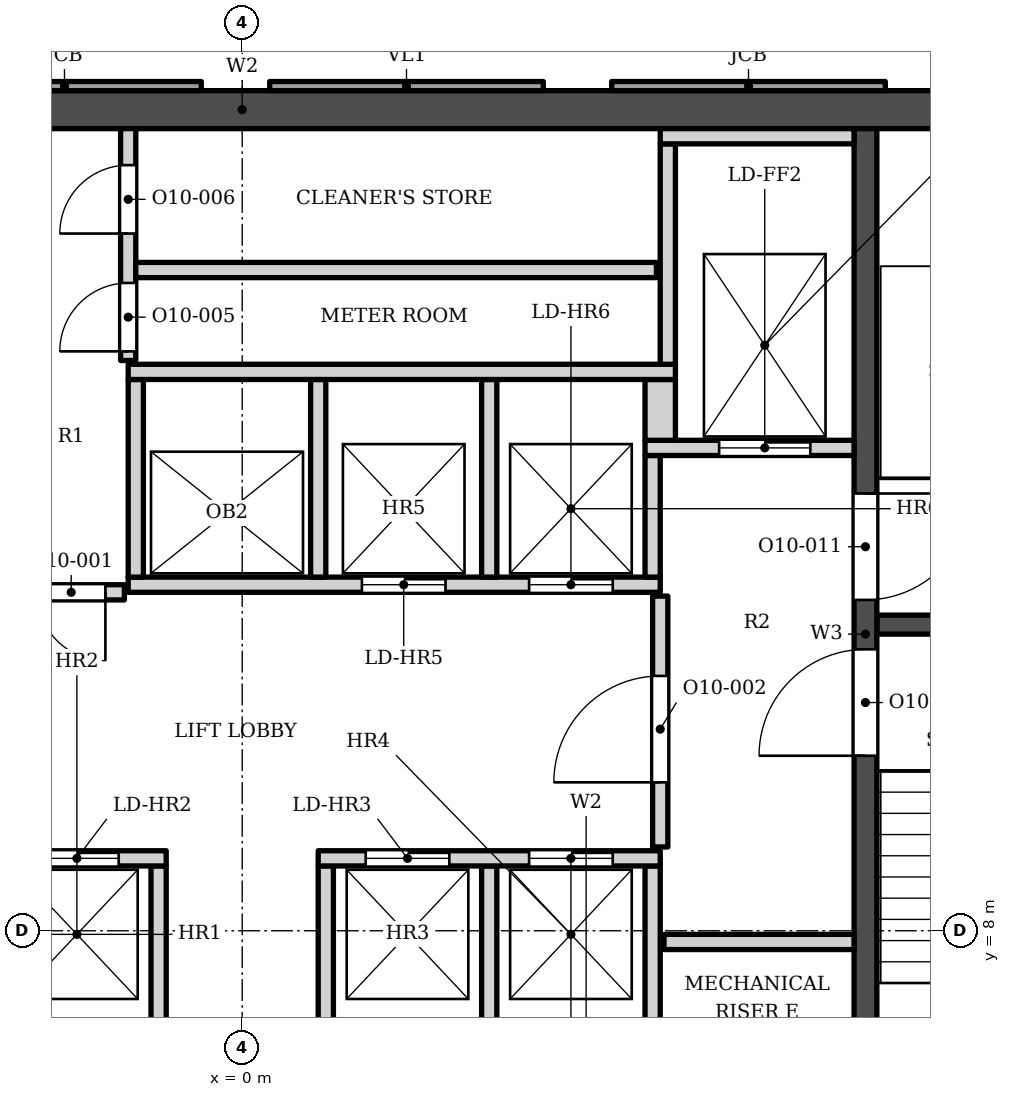
"""IFC4 building model, lengths in metres.
Left out: names, types, materials, properties, quantities, classifications, styles, units other than length and angle.
Written with IfcOpenShell. Run it as: python <this file> out.ifc"""

import sys

from ifc_helpers import new_model, si_unit, direction, frame, frame_2d, origin, place, context, subcontext, project, spatial, polyline, rectangle, outline, extrude, element, fill, save


model = new_model("IFC4")
c1 = context("Model", 3, precision=1e-05, world=origin(), true_north=direction((0.0, 1.0)))
c2 = subcontext(c1, "Body", "Model", "MODEL_VIEW")
j1 = project(units=[si_unit("LENGTHUNIT", "METRE"), si_unit("PLANEANGLEUNIT", "RADIAN")], contexts=[c1])
p1 = place(None, origin())
s1 = spatial("IfcSite", under=j1, at=p1, CompositionType="ELEMENT")
p2 = place(p1, origin())
s2 = spatial("IfcBuilding", under=s1, at=p2, CompositionType="ELEMENT")
p3 = place(p2, frame((0.0, 0.0, 259.9)))
s3 = spatial("IfcBuildingStorey", under=s2, at=p3, CompositionType="ELEMENT", Elevation=259.9)
p4 = place(p3, frame((-12.1, 18.802, 0.0), z_axis=(0.0, 0.0, 1.0), x_axis=(1.0, 0.0, 0.0)))
e1 = element("IfcWall", 1, at=p4, inside=s3, PredefinedType="SHEAR", context=c2, shape_type="SweptSolid", body=[
    extrude(rectangle(XDim=24.2, YDim=0.5, at=frame_2d((12.1, 0.0))), origin(), (0.0, 0.0, 1.0), 3.9),
])
p5 = place(p3, frame((8.2, 5.253, 0.0), z_axis=(0.0, 0.0, 1.0), x_axis=(0.0, 1.0, 0.0)))
e2 = element("IfcWall", 2, at=p5, inside=s3, PredefinedType="SHEAR", context=c2, shape_type="SweptSolid", body=[
    extrude(rectangle(XDim=13.3, YDim=0.3, at=frame_2d((6.65, 0.0))), origin(), (0.0, 0.0, 1.0), 3.9),
])
p6 = place(p5, frame((7.1, 0.0, 0.0)))
e3 = element("IfcOpeningElement", 3, at=p6, cuts=e2, PredefinedType="OPENING", context=c2, shape_type="SweptSolid", body=[
    extrude(rectangle(XDim=1.4, YDim=2.1, at=frame_2d((0.7, 1.05))), frame((0.0, 0.16, 0.0), z_axis=(0.0, -1.0, 0.0), x_axis=(1.0, 0.0, 0.0)), (0.0, 0.0, 1.0), 0.32),
])
p7 = place(p5, frame((5.05, 0.0, 0.0)))
e4 = element("IfcOpeningElement", 4, at=p7, cuts=e2, PredefinedType="OPENING", context=c2, shape_type="SweptSolid", body=[
    extrude(rectangle(XDim=1.4, YDim=2.1, at=frame_2d((0.7, 1.05))), frame((0.0, 0.16, 0.0), z_axis=(0.0, -1.0, 0.0), x_axis=(1.0, 0.0, 0.0)), (0.0, 0.0, 1.0), 0.32),
])
p8 = place(p3, frame((8.35, 12.028, 0.0), z_axis=(0.0, 0.0, 1.0), x_axis=(1.0, 0.0, 0.0)))
e5 = element("IfcWall", 5, at=p8, inside=s3, PredefinedType="SHEAR", context=c2, shape_type="SweptSolid", body=[
    extrude(rectangle(XDim=3.75, YDim=0.25, at=frame_2d((1.875, 0.0))), origin(), (0.0, 0.0, 1.0), 3.9),
])
p9 = place(p3, origin())
e6 = element("IfcWall", 6, at=p9, inside=s3, PredefinedType="SOLIDWALL", context=c2, shape_type="SweptSolid", body=[
    extrude(outline(polyline([(4.862, 19.173), (4.862, 19.052), (8.461, 19.052), (8.461, 19.173), (4.862, 19.173)])), origin(), (0.0, 0.0, 1.0), 3.0),
])
p10 = place(p3, origin())
e7 = element("IfcWall", 7, at=p10, inside=s3, PredefinedType="ELEMENTEDWALL", context=c2, shape_type="SweptSolid", body=[
    extrude(outline(polyline([(0.362, 19.173), (0.362, 19.052), (3.961, 19.052), (3.961, 19.173), (0.362, 19.173)])), origin(), (0.0, 0.0, 1.0), 3.0),
])
p11 = place(p3, origin())
e8 = element("IfcWall", 8, at=p11, inside=s3, PredefinedType="SOLIDWALL", context=c2, shape_type="SweptSolid", body=[
    extrude(outline(polyline([(-4.138, 19.173), (-4.138, 19.052), (-0.539, 19.052), (-0.539, 19.173), (-4.138, 19.173)])), origin(), (0.0, 0.0, 1.0), 3.0),
])
for number, where, z_axis, x_axis in (
    (9, (-1.1, 6.353, 0.0), (0.0, 0.0, 1.0), (0.0, 1.0, 0.0)),
    (10, (1.1, 6.353, 0.0), (0.0, 0.0, 1.0), (0.0, 1.0, 0.0)),
    (11, (3.25, 6.353, 0.0), (0.0, 0.0, 1.0), (0.0, 1.0, 0.0)),
    (12, (5.4, 6.353, 0.0), (0.0, 0.0, 1.0), (0.0, 1.0, 0.0)),
    (13, (5.55, 7.853, 0.0), (0.0, 0.0, 1.0), (1.0, 0.0, 0.0)),
):
    element("IfcWall", number, at=place(p3, frame(where, z_axis=z_axis, x_axis=x_axis)), inside=s3, PredefinedType="SOLIDWALL", context=c2, shape_type="SweptSolid", body=[
        extrude(rectangle(XDim=2.5, YDim=0.2, at=frame_2d((1.25, 0.0))), origin(), (0.0, 0.0, 1.0), 3.73),
    ])
p12 = place(p3, frame((-5.5, 8.953, 0.0), z_axis=(0.0, 0.0, 1.0), x_axis=(1.0, 0.0, 0.0)))
e14 = element("IfcWall", 14, at=p12, inside=s3, PredefinedType="SOLIDWALL", context=c2, shape_type="SweptSolid", body=[
    extrude(rectangle(XDim=4.5, YDim=0.2, at=frame_2d((2.25, 0.0))), origin(), (0.0, 0.0, 1.0), 3.73),
])
p13 = place(p12, frame((0.625, 0.0, 0.0)))
e15 = element("IfcOpeningElement", 15, at=p13, cuts=e14, PredefinedType="OPENING", context=c2, shape_type="SweptSolid", body=[
    extrude(rectangle(XDim=1.1, YDim=2.1, at=frame_2d((0.55, 1.05))), frame((0.0, 0.11, 0.0), z_axis=(0.0, -1.0, 0.0), x_axis=(1.0, 0.0, 0.0)), (0.0, 0.0, 1.0), 0.22),
])
p14 = place(p12, frame((2.775, 0.0, 0.0)))
e16 = element("IfcOpeningElement", 16, at=p14, cuts=e14, PredefinedType="OPENING", context=c2, shape_type="SweptSolid", body=[
    extrude(rectangle(XDim=1.1, YDim=2.1, at=frame_2d((0.55, 1.05))), frame((0.0, 0.11, 0.0), z_axis=(0.0, -1.0, 0.0), x_axis=(1.0, 0.0, 0.0)), (0.0, 0.0, 1.0), 0.22),
])
p15 = place(p3, frame((1.0, 8.953, 0.0), z_axis=(0.0, 0.0, 1.0), x_axis=(1.0, 0.0, 0.0)))
e17 = element("IfcWall", 17, at=p15, inside=s3, PredefinedType="SOLIDWALL", context=c2, shape_type="SweptSolid", body=[
    extrude(rectangle(XDim=4.5, YDim=0.2, at=frame_2d((2.25, 0.0))), origin(), (0.0, 0.0, 1.0), 3.73),
])
p16 = place(p15, frame((0.625, 0.0, 0.0)))
e18 = element("IfcOpeningElement", 18, at=p16, cuts=e17, PredefinedType="OPENING", context=c2, shape_type="SweptSolid", body=[
    extrude(rectangle(XDim=1.1, YDim=2.1, at=frame_2d((0.55, 1.05))), frame((0.0, 0.11, 0.0), z_axis=(0.0, -1.0, 0.0), x_axis=(1.0, 0.0, 0.0)), (0.0, 0.0, 1.0), 0.22),
])
p17 = place(p15, frame((2.775, 0.0, 0.0)))
e19 = element("IfcOpeningElement", 19, at=p17, cuts=e17, PredefinedType="OPENING", context=c2, shape_type="SweptSolid", body=[
    extrude(rectangle(XDim=1.1, YDim=2.1, at=frame_2d((0.55, 1.05))), frame((0.0, 0.11, 0.0), z_axis=(0.0, -1.0, 0.0), x_axis=(1.0, 0.0, 0.0)), (0.0, 0.0, 1.0), 0.22),
])
p18 = place(p3, frame((5.5, 9.103, 0.0), z_axis=(0.0, 0.0, 1.0), x_axis=(0.0, 1.0, 0.0)))
e20 = element("IfcWall", 20, at=p18, inside=s3, PredefinedType="SOLIDWALL", context=c2, shape_type="SweptSolid", body=[
    extrude(rectangle(XDim=3.3, YDim=0.2, at=frame_2d((1.65, 0.0))), origin(), (0.0, 0.0, 1.0), 3.73),
])
p19 = place(p18, frame((0.85, 0.0, 0.0)))
e21 = element("IfcOpeningElement", 21, at=p19, cuts=e20, PredefinedType="OPENING", context=c2, shape_type="SweptSolid", body=[
    extrude(rectangle(XDim=1.4, YDim=2.1, at=frame_2d((0.7, 1.05))), frame((0.0, 0.11, 0.0), z_axis=(0.0, -1.0, 0.0), x_axis=(1.0, 0.0, 0.0)), (0.0, 0.0, 1.0), 0.22),
])
p20 = place(p3, frame((-2.95, 12.453, 0.0), z_axis=(0.0, 0.0, 1.0), x_axis=(1.0, 0.0, 0.0)))
e22 = element("IfcWall", 22, at=p20, inside=s3, PredefinedType="SOLIDWALL", context=c2, shape_type="SweptSolid", body=[
    extrude(rectangle(XDim=1.4, YDim=0.2, at=frame_2d((0.7, 0.0))), origin(), (0.0, 0.0, 1.0), 3.73),
])
p21 = place(p20, frame((0.25, 0.0, 0.0)))
e23 = element("IfcOpeningElement", 23, at=p21, cuts=e22, PredefinedType="OPENING", context=c2, shape_type="SweptSolid", body=[
    extrude(rectangle(XDim=0.9, YDim=2.1, at=frame_2d((0.45, 1.05))), frame((0.0, 0.11, 0.0), z_axis=(0.0, -1.0, 0.0), x_axis=(1.0, 0.0, 0.0)), (0.0, 0.0, 1.0), 0.22),
])
p22 = place(p3, frame((-1.5, 12.552, 0.0), z_axis=(0.0, 0.0, 1.0), x_axis=(1.0, 0.0, 0.0)))
e24 = element("IfcWall", 24, at=p22, inside=s3, PredefinedType="SOLIDWALL", context=c2, shape_type="SweptSolid", body=[
    extrude(rectangle(XDim=7.0, YDim=0.2, at=frame_2d((3.5, 0.0))), origin(), (0.0, 0.0, 1.0), 3.73),
])
p23 = place(p22, frame((3.075, 0.0, 0.0)))
e25 = element("IfcOpeningElement", 25, at=p23, cuts=e24, PredefinedType="OPENING", context=c2, shape_type="SweptSolid", body=[
    extrude(rectangle(XDim=1.1, YDim=2.1, at=frame_2d((0.55, 1.05))), frame((0.0, 0.11, 0.0), z_axis=(0.0, -1.0, 0.0), x_axis=(1.0, 0.0, 0.0)), (0.0, 0.0, 1.0), 0.22),
])
p24 = place(p22, frame((5.275, 0.0, 0.0)))
e26 = element("IfcOpeningElement", 26, at=p24, cuts=e24, PredefinedType="OPENING", context=c2, shape_type="SweptSolid", body=[
    extrude(rectangle(XDim=1.1, YDim=2.1, at=frame_2d((0.55, 1.05))), frame((0.0, 0.11, 0.0), z_axis=(0.0, -1.0, 0.0), x_axis=(1.0, 0.0, 0.0)), (0.0, 0.0, 1.0), 0.22),
])
for number, where, z_axis, x_axis in (
    (27, (-1.4, 12.653, 0.0), (0.0, 0.0, 1.0), (0.0, 1.0, 0.0)),
    (28, (1.0, 12.653, 0.0), (0.0, 0.0, 1.0), (0.0, 1.0, 0.0)),
    (29, (3.25, 12.653, 0.0), (0.0, 0.0, 1.0), (0.0, 1.0, 0.0)),
):
    element("IfcWall", number, at=place(p3, frame(where, z_axis=z_axis, x_axis=x_axis)), inside=s3, PredefinedType="SOLIDWALL", context=c2, shape_type="SweptSolid", body=[
        extrude(rectangle(XDim=2.6, YDim=0.2, at=frame_2d((1.3, 0.0))), origin(), (0.0, 0.0, 1.0), 3.73),
    ])
p25 = place(p3, frame((5.4, 12.653, 0.0), z_axis=(0.0, 0.0, 1.0), x_axis=(0.0, 1.0, 0.0)))
e30 = element("IfcWall", 30, at=p25, inside=s3, PredefinedType="SOLIDWALL", context=c2, shape_type="SweptSolid", body=[
    extrude(rectangle(XDim=1.6, YDim=0.2, at=frame_2d((0.8, 0.0))), origin(), (0.0, 0.0, 1.0), 3.73),
])
p26 = place(p3, frame((5.3, 14.353, 0.0), z_axis=(0.0, 0.0, 1.0), x_axis=(1.0, 0.0, 0.0)))
e31 = element("IfcWall", 31, at=p26, inside=s3, PredefinedType="SOLIDWALL", context=c2, shape_type="SweptSolid", body=[
    extrude(rectangle(XDim=2.75, YDim=0.2, at=frame_2d((1.375, 0.0))), origin(), (0.0, 0.0, 1.0), 3.73),
])
p27 = place(p26, frame((0.975, 0.0, 0.0)))
e32 = element("IfcOpeningElement", 32, at=p27, cuts=e31, PredefinedType="OPENING", context=c2, shape_type="SweptSolid", body=[
    extrude(rectangle(XDim=1.2, YDim=2.1, at=frame_2d((0.6, 1.05))), frame((0.0, 0.11, 0.0), z_axis=(0.0, -1.0, 0.0), x_axis=(1.0, 0.0, 0.0)), (0.0, 0.0, 1.0), 0.22),
])
p28 = place(p3, frame((5.5, 14.453, 0.0), z_axis=(0.0, 0.0, 1.0), x_axis=(0.0, 1.0, 0.0)))
e33 = element("IfcWall", 33, at=p28, inside=s3, PredefinedType="SOLIDWALL", context=c2, shape_type="SweptSolid", body=[
    extrude(rectangle(XDim=0.8, YDim=0.4, at=frame_2d((0.4, 0.0))), origin(), (0.0, 0.0, 1.0), 3.73),
])
p29 = place(p3, frame((-1.5, 15.353, 0.0), z_axis=(0.0, 0.0, 1.0), x_axis=(1.0, 0.0, 0.0)))
e34 = element("IfcWall", 34, at=p29, inside=s3, PredefinedType="SOLIDWALL", context=c2, shape_type="SweptSolid", body=[
    extrude(rectangle(XDim=7.2, YDim=0.2, at=frame_2d((3.6, 0.0))), origin(), (0.0, 0.0, 1.0), 3.73),
])
p30 = place(p3, frame((5.6, 15.453, 0.0), z_axis=(0.0, 0.0, 1.0), x_axis=(0.0, 1.0, 0.0)))
e35 = element("IfcWall", 35, at=p30, inside=s3, PredefinedType="SOLIDWALL", context=c2, shape_type="SweptSolid", body=[
    extrude(rectangle(XDim=2.9, YDim=0.2, at=frame_2d((1.45, 0.0))), origin(), (0.0, 0.0, 1.0), 3.73),
])
p31 = place(p3, frame((-1.5, 15.503, 0.0), z_axis=(0.0, 0.0, 1.0), x_axis=(0.0, 1.0, 0.0)))
e36 = element("IfcWall", 36, at=p31, inside=s3, PredefinedType="SOLIDWALL", context=c2, shape_type="SweptSolid", body=[
    extrude(rectangle(XDim=3.05, YDim=0.2, at=frame_2d((1.525, 0.0))), origin(), (0.0, 0.0, 1.0), 3.73),
])
p32 = place(p31, frame((0.12, 0.0, 0.0)))
e37 = element("IfcOpeningElement", 37, at=p32, cuts=e36, PredefinedType="OPENING", context=c2, shape_type="SweptSolid", body=[
    extrude(rectangle(XDim=0.9, YDim=2.1, at=frame_2d((0.45, 1.05))), frame((0.0, 0.11, 0.0), z_axis=(0.0, -1.0, 0.0), x_axis=(1.0, 0.0, 0.0)), (0.0, 0.0, 1.0), 0.22),
])
p33 = place(p31, frame((1.67, 0.0, 0.0)))
e38 = element("IfcOpeningElement", 38, at=p33, cuts=e36, PredefinedType="OPENING", context=c2, shape_type="SweptSolid", body=[
    extrude(rectangle(XDim=0.9, YDim=2.1, at=frame_2d((0.45, 1.05))), frame((0.0, 0.11, 0.0), z_axis=(0.0, -1.0, 0.0), x_axis=(1.0, 0.0, 0.0)), (0.0, 0.0, 1.0), 0.22),
])
p34 = place(p3, frame((-1.4, 16.693, 0.0), z_axis=(0.0, 0.0, 1.0), x_axis=(1.0, 0.0, 0.0)))
e39 = element("IfcWall", 39, at=p34, inside=s3, PredefinedType="SOLIDWALL", context=c2, shape_type="SweptSolid", body=[
    extrude(rectangle(XDim=6.85, YDim=0.2, at=frame_2d((3.425, 0.0))), origin(), (0.0, 0.0, 1.0), 3.73),
])
p35 = place(p3, frame((5.5, 18.453, 0.0), z_axis=(0.0, 0.0, 1.0), x_axis=(1.0, 0.0, 0.0)))
e40 = element("IfcWall", 40, at=p35, inside=s3, PredefinedType="SOLIDWALL", context=c2, shape_type="SweptSolid", body=[
    extrude(rectangle(XDim=2.55, YDim=0.2, at=frame_2d((1.275, 0.0))), origin(), (0.0, 0.0, 1.0), 3.73),
])
p36 = place(p14, origin())
e41 = element("IfcDoor", 41, at=p36, inside=s3, OperationType="DOUBLE_DOOR_SLIDING", PredefinedType="DOOR", context=c2, shape_type="SweptSolid", body=[
    extrude(rectangle(XDim=1.1, YDim=2.1, at=frame_2d((0.55, 1.05))), frame((0.0, 0.025, 0.0), z_axis=(0.0, -1.0, 0.0), x_axis=(1.0, 0.0, 0.0)), (0.0, 0.0, 1.0), 0.05),
])
fill(e16, e41)
p37 = place(p16, origin())
e42 = element("IfcDoor", 42, at=p37, inside=s3, OperationType="DOUBLE_DOOR_SLIDING", PredefinedType="DOOR", context=c2, shape_type="SweptSolid", body=[
    extrude(rectangle(XDim=1.1, YDim=2.1, at=frame_2d((0.55, 1.05))), frame((0.0, 0.025, 0.0), z_axis=(0.0, -1.0, 0.0), x_axis=(1.0, 0.0, 0.0)), (0.0, 0.0, 1.0), 0.05),
])
fill(e18, e42)
p38 = place(p17, origin())
e43 = element("IfcDoor", 43, at=p38, inside=s3, OperationType="DOUBLE_DOOR_SLIDING", PredefinedType="DOOR", context=c2, shape_type="SweptSolid", body=[
    extrude(rectangle(XDim=1.1, YDim=2.1, at=frame_2d((0.55, 1.05))), frame((0.0, 0.025, 0.0), z_axis=(0.0, -1.0, 0.0), x_axis=(1.0, 0.0, 0.0)), (0.0, 0.0, 1.0), 0.05),
])
fill(e19, e43)
p39 = place(p23, origin())
e44 = element("IfcDoor", 44, at=p39, inside=s3, OperationType="DOUBLE_DOOR_SLIDING", PredefinedType="DOOR", context=c2, shape_type="SweptSolid", body=[
    extrude(rectangle(XDim=1.1, YDim=2.1, at=frame_2d((0.55, 1.05))), frame((0.0, 0.025, 0.0), z_axis=(0.0, -1.0, 0.0), x_axis=(1.0, 0.0, 0.0)), (0.0, 0.0, 1.0), 0.05),
])
fill(e25, e44)
p40 = place(p24, origin())
e45 = element("IfcDoor", 45, at=p40, inside=s3, OperationType="DOUBLE_DOOR_SLIDING", PredefinedType="DOOR", context=c2, shape_type="SweptSolid", body=[
    extrude(rectangle(XDim=1.1, YDim=2.1, at=frame_2d((0.55, 1.05))), frame((0.0, 0.025, 0.0), z_axis=(0.0, -1.0, 0.0), x_axis=(1.0, 0.0, 0.0)), (0.0, 0.0, 1.0), 0.05),
])
fill(e26, e45)
p41 = place(p27, origin())
e46 = element("IfcDoor", 46, at=p41, inside=s3, OperationType="DOUBLE_DOOR_SLIDING", PredefinedType="DOOR", context=c2, shape_type="SweptSolid", body=[
    extrude(rectangle(XDim=1.2, YDim=2.1, at=frame_2d((0.6, 1.05))), frame((0.0, 0.025, 0.0), z_axis=(0.0, -1.0, 0.0), x_axis=(1.0, 0.0, 0.0)), (0.0, 0.0, 1.0), 0.05),
])
fill(e32, e46)
p42 = place(p6, origin())
e47 = element("IfcDoor", 47, at=p42, inside=s3, OperationType="SINGLE_SWING_RIGHT", PredefinedType="DOOR", context=c2, shape_type="SweptSolid", body=[
    extrude(rectangle(XDim=1.4, YDim=2.1, at=frame_2d((0.7, 1.05))), frame((0.0, 0.025, 0.0), z_axis=(0.0, -1.0, 0.0), x_axis=(1.0, 0.0, 0.0)), (0.0, 0.0, 1.0), 0.05),
])
fill(e3, e47)
p43 = place(p7, origin())
e48 = element("IfcDoor", 48, at=p43, inside=s3, OperationType="SINGLE_SWING_LEFT", PredefinedType="DOOR", context=c2, shape_type="SweptSolid", body=[
    extrude(rectangle(XDim=1.4, YDim=2.1, at=frame_2d((0.7, 1.05))), frame((0.0, 0.025, 0.0), z_axis=(0.0, -1.0, 0.0), x_axis=(1.0, 0.0, 0.0)), (0.0, 0.0, 1.0), 0.05),
])
fill(e4, e48)
p44 = place(p21, origin())
e49 = element("IfcDoor", 49, at=p44, inside=s3, OperationType="SINGLE_SWING_RIGHT", PredefinedType="DOOR", context=c2, shape_type="SweptSolid", body=[
    extrude(rectangle(XDim=0.9, YDim=2.1, at=frame_2d((0.45, 1.05))), frame((0.0, 0.025, 0.0), z_axis=(0.0, -1.0, 0.0), x_axis=(1.0, 0.0, 0.0)), (0.0, 0.0, 1.0), 0.05),
])
fill(e23, e49)
p45 = place(p19, origin())
e50 = element("IfcDoor", 50, at=p45, inside=s3, OperationType="SINGLE_SWING_LEFT", PredefinedType="DOOR", context=c2, shape_type="SweptSolid", body=[
    extrude(rectangle(XDim=1.4, YDim=2.1, at=frame_2d((0.7, 1.05))), frame((0.0, 0.025, 0.0), z_axis=(0.0, -1.0, 0.0), x_axis=(1.0, 0.0, 0.0)), (0.0, 0.0, 1.0), 0.05),
])
fill(e21, e50)
p46 = place(p32, origin())
e51 = element("IfcDoor", 51, at=p46, inside=s3, OperationType="SINGLE_SWING_LEFT", PredefinedType="DOOR", context=c2, shape_type="SweptSolid", body=[
    extrude(rectangle(XDim=0.9, YDim=2.1, at=frame_2d((0.45, 1.05))), frame((0.0, 0.025, 0.0), z_axis=(0.0, -1.0, 0.0), x_axis=(1.0, 0.0, 0.0)), (0.0, 0.0, 1.0), 0.05),
])
fill(e37, e51)
p47 = place(p33, origin())
e52 = element("IfcDoor", 52, at=p47, inside=s3, OperationType="SINGLE_SWING_LEFT", PredefinedType="DOOR", context=c2, shape_type="SweptSolid", body=[
    extrude(rectangle(XDim=0.9, YDim=2.1, at=frame_2d((0.45, 1.05))), frame((0.0, 0.025, 0.0), z_axis=(0.0, -1.0, 0.0), x_axis=(1.0, 0.0, 0.0)), (0.0, 0.0, 1.0), 0.05),
])
fill(e38, e52)
save(model, sys.argv[1])
